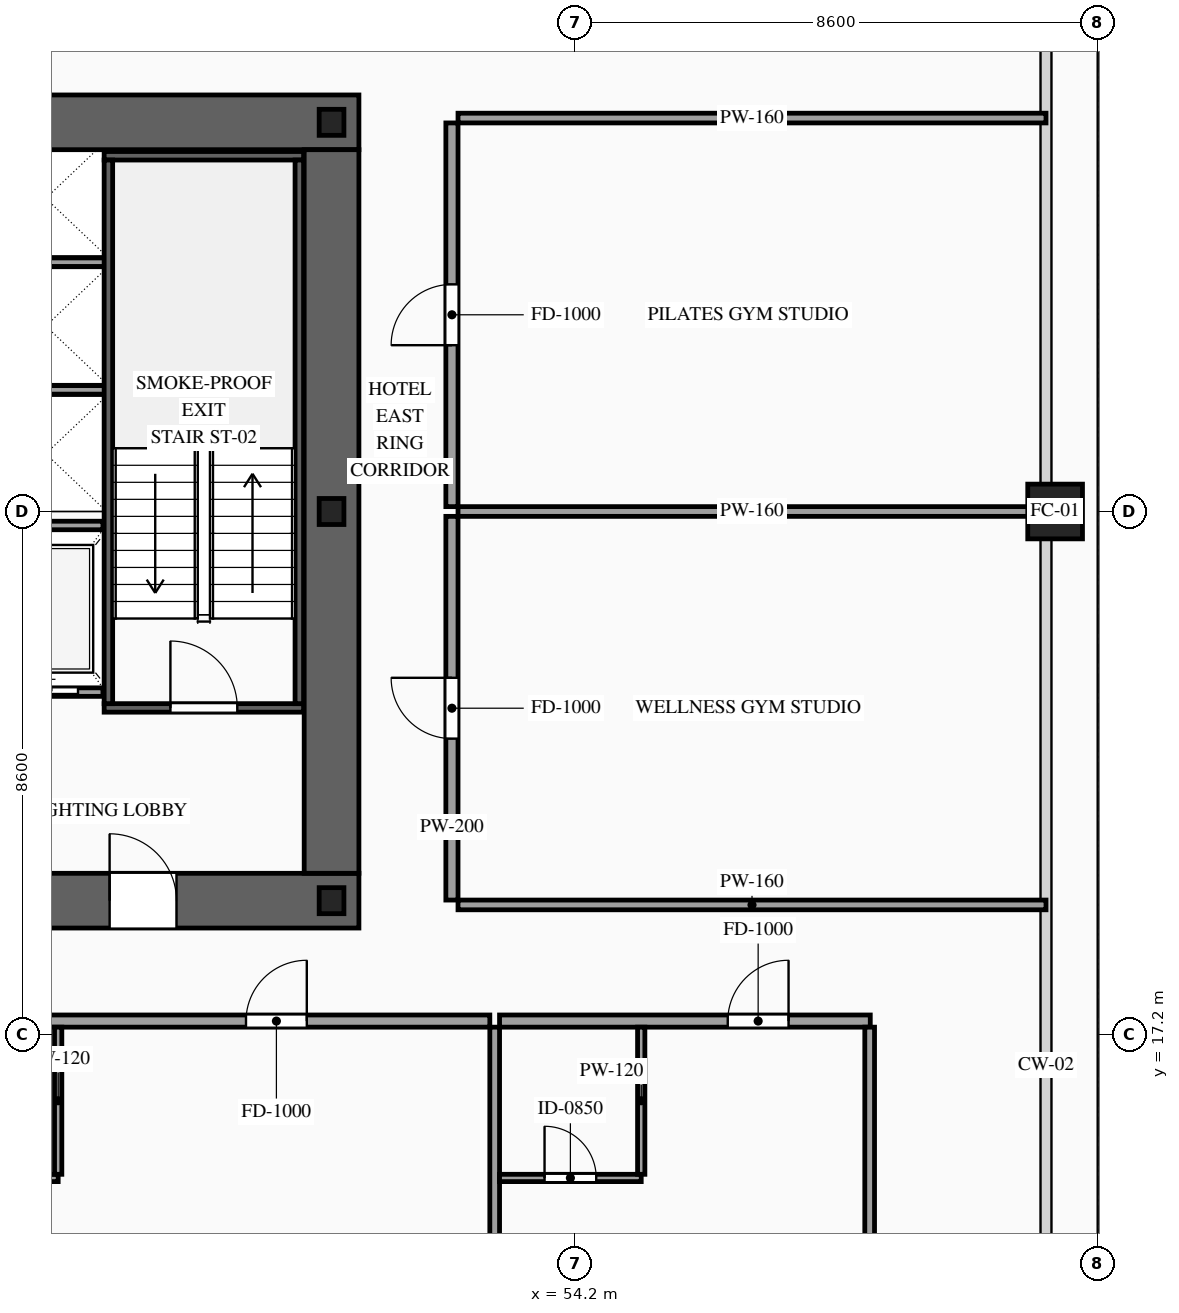
"""IFC4 building model, lengths in metres.
Left out: names, types, materials, properties, quantities, classifications, styles, units other than length and angle.
Written with IfcOpenShell. Run it as: python <this file> out.ifc"""

import sys

from ifc_helpers import new_model, si_unit, direction, frame, frame_2d, origin, origin_2d, place, context, subcontext, project, spatial, rectangle, hollow_rectangle, i_section, extrude, source, transform, mapped, element, fill, save


model = new_model("IFC4")
c1 = context("Model", 3, precision=1e-05, world=origin(), true_north=direction((0.0, 1.0)))
c2 = subcontext(c1, "Body", "Model", "MODEL_VIEW")
j1 = project(units=[si_unit("LENGTHUNIT", "METRE"), si_unit("PLANEANGLEUNIT", "RADIAN")], contexts=[c1])
p1 = place(None, origin())
s1 = spatial("IfcSite", under=j1, at=p1, CompositionType="ELEMENT")
p2 = place(p1, origin())
s2 = spatial("IfcBuilding", under=s1, at=p2, CompositionType="ELEMENT")
p3 = place(p2, frame((0.0, 0.0, 74.8)))
s3 = spatial("IfcBuildingStorey", under=s2, at=p3, CompositionType="ELEMENT", Elevation=74.8)
p4 = place(p3, frame((23.35, 19.4, 0.0), z_axis=(0.0, 0.0, 1.0), x_axis=(1.0, 0.0, 0.0)))
e1 = element("IfcWall", 1, at=p4, inside=s3, PredefinedType="SHEAR", context=c2, shape_type="SweptSolid", body=[
    extrude(rectangle(XDim=27.3, YDim=0.9, at=frame_2d((13.65, 0.0))), origin(), (0.0, 0.0, 1.0), 3.6),
])
p5 = place(p4, frame((2.1, 0.0, 0.0)))
e2 = element("IfcOpeningElement", 2, at=p5, cuts=e1, PredefinedType="OPENING", context=c2, shape_type="SweptSolid", body=[
    extrude(rectangle(XDim=1.1, YDim=2.2, at=frame_2d((0.55, 1.1))), frame((0.0, 0.465, 0.0), z_axis=(0.0, -1.0, 0.0), x_axis=(1.0, 0.0, 0.0)), (0.0, 0.0, 1.0), 0.93),
])
p6 = place(p4, frame((10.0, 0.0, 0.0)))
e3 = element("IfcOpeningElement", 3, at=p6, cuts=e1, PredefinedType="OPENING", context=c2, shape_type="SweptSolid", body=[
    extrude(rectangle(XDim=1.1, YDim=2.2, at=frame_2d((0.55, 1.1))), frame((0.0, 0.465, 0.0), z_axis=(0.0, -1.0, 0.0), x_axis=(1.0, 0.0, 0.0)), (0.0, 0.0, 1.0), 0.93),
])
p7 = place(p4, frame((23.2, 0.0, 0.0)))
e4 = element("IfcOpeningElement", 4, at=p7, cuts=e1, PredefinedType="OPENING", context=c2, shape_type="SweptSolid", body=[
    extrude(rectangle(XDim=1.1, YDim=2.2, at=frame_2d((0.55, 1.1))), frame((0.0, 0.465, 0.0), z_axis=(0.0, -1.0, 0.0), x_axis=(1.0, 0.0, 0.0)), (0.0, 0.0, 1.0), 0.93),
])
p8 = place(p4, frame((19.82, 0.0, 0.0)))
e5 = element("IfcOpeningElement", 5, at=p8, cuts=e1, PredefinedType="OPENING", context=c2, shape_type="SweptSolid", body=[
    extrude(rectangle(XDim=0.9, YDim=2.15, at=frame_2d((0.45, 1.075))), frame((0.0, 0.465, 0.0), z_axis=(0.0, -1.0, 0.0), x_axis=(1.0, 0.0, 0.0)), (0.0, 0.0, 1.0), 0.93),
])
p9 = place(p4, frame((18.38, 0.0, 0.0)))
e6 = element("IfcOpeningElement", 6, at=p9, cuts=e1, PredefinedType="OPENING", context=c2, shape_type="SweptSolid", body=[
    extrude(rectangle(XDim=0.9, YDim=2.15, at=frame_2d((0.45, 1.075))), frame((0.0, 0.465, 0.0), z_axis=(0.0, -1.0, 0.0), x_axis=(1.0, 0.0, 0.0)), (0.0, 0.0, 1.0), 0.93),
])
p10 = place(p3, frame((23.35, 32.2, 0.0), z_axis=(0.0, 0.0, 1.0), x_axis=(1.0, 0.0, 0.0)))
e7 = element("IfcWall", 7, at=p10, inside=s3, PredefinedType="SHEAR", context=c2, shape_type="SweptSolid", body=[
    extrude(rectangle(XDim=27.3, YDim=0.9, at=frame_2d((13.65, 0.0))), origin(), (0.0, 0.0, 1.0), 3.6),
])
p11 = place(p10, frame((4.72, 0.0, 0.0)))
e8 = element("IfcOpeningElement", 8, at=p11, cuts=e7, PredefinedType="OPENING", context=c2, shape_type="SweptSolid", body=[
    extrude(rectangle(XDim=0.9, YDim=2.15, at=frame_2d((0.45, 1.075))), frame((0.0, 0.465, 0.0), z_axis=(0.0, -1.0, 0.0), x_axis=(1.0, 0.0, 0.0)), (0.0, 0.0, 1.0), 0.93),
])
p12 = place(p10, frame((10.0, 0.0, 0.0)))
e9 = element("IfcOpeningElement", 9, at=p12, cuts=e7, PredefinedType="OPENING", context=c2, shape_type="SweptSolid", body=[
    extrude(rectangle(XDim=1.1, YDim=2.2, at=frame_2d((0.55, 1.1))), frame((0.0, 0.465, 0.0), z_axis=(0.0, -1.0, 0.0), x_axis=(1.0, 0.0, 0.0)), (0.0, 0.0, 1.0), 0.93),
])
p13 = place(p10, frame((15.85, 0.0, 0.0)))
e10 = element("IfcOpeningElement", 10, at=p13, cuts=e7, PredefinedType="OPENING", context=c2, shape_type="SweptSolid", body=[
    extrude(rectangle(XDim=1.1, YDim=2.2, at=frame_2d((0.55, 1.1))), frame((0.0, 0.465, 0.0), z_axis=(0.0, -1.0, 0.0), x_axis=(1.0, 0.0, 0.0)), (0.0, 0.0, 1.0), 0.93),
])
p14 = place(p10, frame((18.38, 0.0, 0.0)))
e11 = element("IfcOpeningElement", 11, at=p14, cuts=e7, PredefinedType="OPENING", context=c2, shape_type="SweptSolid", body=[
    extrude(rectangle(XDim=0.9, YDim=2.15, at=frame_2d((0.45, 1.075))), frame((0.0, 0.465, 0.0), z_axis=(0.0, -1.0, 0.0), x_axis=(1.0, 0.0, 0.0)), (0.0, 0.0, 1.0), 0.93),
])
p15 = place(p10, frame((19.82, 0.0, 0.0)))
e12 = element("IfcOpeningElement", 12, at=p15, cuts=e7, PredefinedType="OPENING", context=c2, shape_type="SweptSolid", body=[
    extrude(rectangle(XDim=0.9, YDim=2.15, at=frame_2d((0.45, 1.075))), frame((0.0, 0.465, 0.0), z_axis=(0.0, -1.0, 0.0), x_axis=(1.0, 0.0, 0.0)), (0.0, 0.0, 1.0), 0.93),
])
m1 = source(origin(), c2, "Body", "SweptSolid", [
    extrude(rectangle(XDim=11.9, YDim=0.9, at=frame_2d((5.95, 0.0))), origin(), (0.0, 0.0, 1.0), 3.6),
])
p16 = place(p3, frame((50.2, 19.85, 0.0), z_axis=(0.0, 0.0, 1.0), x_axis=(0.0, 1.0, 0.0)))
e13 = element("IfcWall", 13, at=p16, inside=s3, PredefinedType="SHEAR", context=c2, shape_type="MappedRepresentation", body=[
    mapped(m1, transform((0.0, 0.0, 0.0), scale=1.0)),
])
m2 = source(origin(), c2, "Body", "SweptSolid", [
    extrude(i_section(OverallWidth=0.407, OverallDepth=0.428, WebThickness=0.02, FlangeThickness=0.035, at=origin_2d()), origin(), (0.0, 0.0, 1.0), 3.6),
])
for number, where, z_axis, x_axis in (
    (14, (50.2, 19.4, 0.0), (0.0, 0.0, 1.0), (1.0, 0.0, 0.0)),
    (15, (50.2, 25.8, 0.0), (0.0, 0.0, 1.0), (1.0, 0.0, 0.0)),
    (16, (50.2, 32.2, 0.0), (0.0, 0.0, 1.0), (1.0, 0.0, 0.0)),
):
    element("IfcColumn", number, at=place(p3, frame(where, z_axis=z_axis, x_axis=x_axis)), inside=s3, PredefinedType="COLUMN", context=c2, shape_type="MappedRepresentation", body=[
        mapped(m2, transform((0.0, 0.0, 0.0), scale=1.0)),
    ])
m3 = source(origin(), c2, "Body", "SweptSolid", [
    extrude(hollow_rectangle(XDim=0.9, YDim=0.9, WallThickness=0.042, at=origin_2d()), origin(), (0.0, 0.0, 1.0), 3.6),
])
p17 = place(p3, frame((62.1, 25.8, 0.0), z_axis=(0.0, 0.0, 1.0), x_axis=(1.0, 0.0, 0.0)))
e17 = element("IfcColumn", 17, at=p17, inside=s3, PredefinedType="COLUMN", context=c2, shape_type="MappedRepresentation", body=[
    mapped(m3, transform((0.0, 0.0, 0.0), scale=1.0)),
])
p18 = place(p3, frame((44.52, 22.83, 0.0), z_axis=(0.0, 0.0, 1.0), x_axis=(1.0, 0.0, 0.0)))
e18 = element("IfcWall", 18, at=p18, inside=s3, PredefinedType="SOLIDWALL", context=c2, shape_type="SweptSolid", body=[
    extrude(rectangle(XDim=1.92, YDim=0.14, at=frame_2d((0.96, 0.0))), origin(), (0.0, 0.0, 1.0), 3.38),
])
p19 = place(p18, frame((0.41, 0.0, 0.0)))
e19 = element("IfcOpeningElement", 19, at=p19, cuts=e18, PredefinedType="OPENING", context=c2, shape_type="SweptSolid", body=[
    extrude(rectangle(XDim=1.1, YDim=2.2, at=frame_2d((0.55, 1.1))), frame((0.0, 0.085, 0.0), z_axis=(0.0, -1.0, 0.0), x_axis=(1.0, 0.0, 0.0)), (0.0, 0.0, 1.0), 0.17),
])
m4 = source(origin(), c2, "Body", "SweptSolid", [
    extrude(rectangle(XDim=1.92, YDim=0.14, at=frame_2d((0.96, 0.0))), origin(), (0.0, 0.0, 1.0), 3.38),
])
p20 = place(p3, frame((44.52, 25.57, 0.0), z_axis=(0.0, 0.0, 1.0), x_axis=(1.0, 0.0, 0.0)))
e20 = element("IfcWall", 20, at=p20, inside=s3, PredefinedType="SOLIDWALL", context=c2, shape_type="MappedRepresentation", body=[
    mapped(m4, transform((0.0, 0.0, 0.0), scale=1.0)),
])
m5 = source(origin(), c2, "Body", "SweptSolid", [
    extrude(rectangle(XDim=2.0, YDim=0.14, at=frame_2d((1.0, 0.0))), origin(), (0.0, 0.0, 1.0), 3.38),
])
for number, where, z_axis, x_axis in (
    (21, (44.5, 27.8, 0.0), (0.0, 0.0, 1.0), (1.0, 0.0, 0.0)),
    (22, (44.5, 29.9, 0.0), (0.0, 0.0, 1.0), (1.0, 0.0, 0.0)),
):
    element("IfcWall", number, at=place(p3, frame(where, z_axis=z_axis, x_axis=x_axis)), inside=s3, PredefinedType="SOLIDWALL", context=c2, shape_type="MappedRepresentation", body=[
        mapped(m5, transform((0.0, 0.0, 0.0), scale=1.0)),
    ])
p21 = place(p3, frame((46.46, 22.57, 0.0), z_axis=(0.0, 0.0, 1.0), x_axis=(1.0, 0.0, 0.0)))
e23 = element("IfcWall", 23, at=p21, inside=s3, PredefinedType="SOLIDWALL", context=c2, shape_type="SweptSolid", body=[
    extrude(rectangle(XDim=3.28, YDim=0.14, at=frame_2d((1.64, 0.0))), origin(), (0.0, 0.0, 1.0), 3.38),
])
p22 = place(p21, frame((1.09, 0.0, 0.0)))
e24 = element("IfcOpeningElement", 24, at=p22, cuts=e23, PredefinedType="OPENING", context=c2, shape_type="SweptSolid", body=[
    extrude(rectangle(XDim=1.1, YDim=2.2, at=frame_2d((0.55, 1.1))), frame((0.0, 0.085, 0.0), z_axis=(0.0, -1.0, 0.0), x_axis=(1.0, 0.0, 0.0)), (0.0, 0.0, 1.0), 0.17),
])
m6 = source(origin(), c2, "Body", "SweptSolid", [
    extrude(rectangle(XDim=3.28, YDim=0.14, at=frame_2d((1.64, 0.0))), origin(), (0.0, 0.0, 1.0), 3.38),
])
p23 = place(p3, frame((46.46, 31.65, 0.0), z_axis=(0.0, 0.0, 1.0), x_axis=(1.0, 0.0, 0.0)))
e25 = element("IfcWall", 25, at=p23, inside=s3, PredefinedType="SOLIDWALL", context=c2, shape_type="MappedRepresentation", body=[
    mapped(m6, transform((0.0, 0.0, 0.0), scale=1.0)),
])
m7 = source(origin(), c2, "Body", "SweptSolid", [
    extrude(rectangle(XDim=8.94, YDim=0.14, at=frame_2d((4.47, 0.0))), origin(), (0.0, 0.0, 1.0), 3.38),
])
for number, where, z_axis, x_axis in (
    (26, (46.53, 22.64, 0.0), (0.0, 0.0, 1.0), (0.0, 1.0, 0.0)),
    (27, (49.67, 22.64, 0.0), (0.0, 0.0, 1.0), (0.0, 1.0, 0.0)),
):
    element("IfcWall", number, at=place(p3, frame(where, z_axis=z_axis, x_axis=x_axis)), inside=s3, PredefinedType="SOLIDWALL", context=c2, shape_type="MappedRepresentation", body=[
        mapped(m7, transform((0.0, 0.0, 0.0), scale=1.0)),
    ])
p24 = place(p3, frame((43.374, 17.42, 0.0), z_axis=(0.0, 0.0, 1.0), x_axis=(1.0, 0.0, 0.0)))
e28 = element("IfcWall", 28, at=p24, inside=s3, PredefinedType="PARTITIONING", context=c2, shape_type="SweptSolid", body=[
    extrude(rectangle(XDim=9.429, YDim=0.2, at=frame_2d((4.714, 0.0))), origin(), (0.0, 0.0, 1.0), 3.38),
])
p25 = place(p24, frame((5.419, 0.0, 0.0)))
e29 = element("IfcOpeningElement", 29, at=p25, cuts=e28, PredefinedType="OPENING", context=c2, shape_type="SweptSolid", body=[
    extrude(rectangle(XDim=1.0, YDim=2.2, at=frame_2d((0.5, 1.1))), frame((0.0, 0.115, 0.0), z_axis=(0.0, -1.0, 0.0), x_axis=(1.0, 0.0, 0.0)), (0.0, 0.0, 1.0), 0.23),
])
m8 = source(origin(), c2, "Body", "SweptSolid", [
    extrude(rectangle(XDim=16.47, YDim=0.16, at=frame_2d((8.235, 0.0))), origin(), (0.0, 0.0, 1.0), 3.38),
])
p26 = place(p3, frame((52.883, 0.85, 0.0), z_axis=(0.0, 0.0, 1.0), x_axis=(0.0, 1.0, 0.0)))
e30 = element("IfcWall", 30, at=p26, inside=s3, PredefinedType="PARTITIONING", context=c2, shape_type="MappedRepresentation", body=[
    mapped(m8, transform((0.0, 0.0, 0.0), scale=1.0)),
])
p27 = place(p3, frame((43.374, 14.84, 0.0), z_axis=(0.0, 0.0, 1.0), x_axis=(1.0, 0.0, 0.0)))
e31 = element("IfcWall", 31, at=p27, inside=s3, PredefinedType="PARTITIONING", context=c2, shape_type="SweptSolid", body=[
    extrude(rectangle(XDim=2.33, YDim=0.12, at=frame_2d((1.165, 0.0))), origin(), (0.0, 0.0, 1.0), 3.38),
])
p28 = place(p27, frame((0.74, 0.0, 0.0)))
e32 = element("IfcOpeningElement", 32, at=p28, cuts=e31, PredefinedType="OPENING", context=c2, shape_type="SweptSolid", body=[
    extrude(rectangle(XDim=0.85, YDim=2.1, at=frame_2d((0.425, 1.05))), frame((0.0, 0.075, 0.0), z_axis=(0.0, -1.0, 0.0), x_axis=(1.0, 0.0, 0.0)), (0.0, 0.0, 1.0), 0.15),
])
m9 = source(origin(), c2, "Body", "SweptSolid", [
    extrude(rectangle(XDim=2.42, YDim=0.12, at=frame_2d((1.21, 0.0))), origin(), (0.0, 0.0, 1.0), 3.38),
])
p29 = place(p3, frame((45.704, 14.9, 0.0), z_axis=(0.0, 0.0, 1.0), x_axis=(0.0, 1.0, 0.0)))
e33 = element("IfcWall", 33, at=p29, inside=s3, PredefinedType="PARTITIONING", context=c2, shape_type="MappedRepresentation", body=[
    mapped(m9, transform((0.0, 0.0, 0.0), scale=1.0)),
])
p30 = place(p3, frame((52.963, 17.42, 0.0), z_axis=(0.0, 0.0, 1.0), x_axis=(1.0, 0.0, 0.0)))
e34 = element("IfcWall", 34, at=p30, inside=s3, PredefinedType="PARTITIONING", context=c2, shape_type="SweptSolid", body=[
    extrude(rectangle(XDim=6.097, YDim=0.2, at=frame_2d((3.049, 0.0))), origin(), (0.0, 0.0, 1.0), 3.38),
])
p31 = place(p30, frame((3.753, 0.0, 0.0)))
e35 = element("IfcOpeningElement", 35, at=p31, cuts=e34, PredefinedType="OPENING", context=c2, shape_type="SweptSolid", body=[
    extrude(rectangle(XDim=1.0, YDim=2.2, at=frame_2d((0.5, 1.1))), frame((0.0, 0.115, 0.0), z_axis=(0.0, -1.0, 0.0), x_axis=(1.0, 0.0, 0.0)), (0.0, 0.0, 1.0), 0.23),
])
m10 = source(origin(), c2, "Body", "SweptSolid", [
    extrude(rectangle(XDim=16.32, YDim=0.16, at=frame_2d((8.16, 0.0))), origin(), (0.0, 0.0, 1.0), 3.38),
])
p32 = place(p3, frame((59.05, 1.0, 0.0), z_axis=(0.0, 0.0, 1.0), x_axis=(0.0, 1.0, 0.0)))
e36 = element("IfcWall", 36, at=p32, inside=s3, PredefinedType="PARTITIONING", context=c2, shape_type="MappedRepresentation", body=[
    mapped(m10, transform((0.0, 0.0, 0.0), scale=1.0)),
])
p33 = place(p3, frame((52.963, 14.84, 0.0), z_axis=(0.0, 0.0, 1.0), x_axis=(1.0, 0.0, 0.0)))
e37 = element("IfcWall", 37, at=p33, inside=s3, PredefinedType="PARTITIONING", context=c2, shape_type="SweptSolid", body=[
    extrude(rectangle(XDim=2.33, YDim=0.12, at=frame_2d((1.165, 0.0))), origin(), (0.0, 0.0, 1.0), 3.38),
])
p34 = place(p33, frame((0.74, 0.0, 0.0)))
e38 = element("IfcOpeningElement", 38, at=p34, cuts=e37, PredefinedType="OPENING", context=c2, shape_type="SweptSolid", body=[
    extrude(rectangle(XDim=0.85, YDim=2.1, at=frame_2d((0.425, 1.05))), frame((0.0, 0.075, 0.0), z_axis=(0.0, -1.0, 0.0), x_axis=(1.0, 0.0, 0.0)), (0.0, 0.0, 1.0), 0.15),
])
p35 = place(p3, frame((55.293, 14.9, 0.0), z_axis=(0.0, 0.0, 1.0), x_axis=(0.0, 1.0, 0.0)))
e39 = element("IfcWall", 39, at=p35, inside=s3, PredefinedType="PARTITIONING", context=c2, shape_type="MappedRepresentation", body=[
    mapped(m9, transform((0.0, 0.0, 0.0), scale=1.0)),
])
p36 = place(p3, frame((52.18, 19.41, 0.0), z_axis=(0.0, 0.0, 1.0), x_axis=(0.0, 1.0, 0.0)))
e40 = element("IfcWall", 40, at=p36, inside=s3, PredefinedType="PARTITIONING", context=c2, shape_type="SweptSolid", body=[
    extrude(rectangle(XDim=6.31, YDim=0.2, at=frame_2d((3.155, 0.0))), origin(), (0.0, 0.0, 1.0), 3.38),
])
p37 = place(p36, frame((2.655, 0.0, 0.0)))
e41 = element("IfcOpeningElement", 41, at=p37, cuts=e40, PredefinedType="OPENING", context=c2, shape_type="SweptSolid", body=[
    extrude(rectangle(XDim=1.0, YDim=2.2, at=frame_2d((0.5, 1.1))), frame((0.0, 0.115, 0.0), z_axis=(0.0, -1.0, 0.0), x_axis=(1.0, 0.0, 0.0)), (0.0, 0.0, 1.0), 0.23),
])
m11 = source(origin(), c2, "Body", "SweptSolid", [
    extrude(rectangle(XDim=9.67, YDim=0.16, at=frame_2d((4.835, 0.0))), origin(), (0.0, 0.0, 1.0), 2.575),
])
p38 = place(p3, frame((52.28, 25.8, 0.0), z_axis=(0.0, 0.0, 1.0), x_axis=(1.0, 0.0, 0.0)))
e42 = element("IfcWall", 42, at=p38, inside=s3, PredefinedType="PARTITIONING", context=c2, shape_type="MappedRepresentation", body=[
    mapped(m11, transform((0.0, 0.0, 0.0), scale=1.0)),
])
m12 = source(origin(), c2, "Body", "SweptSolid", [
    extrude(rectangle(XDim=9.67, YDim=0.16, at=frame_2d((4.835, 0.0))), origin(), (0.0, 0.0, 1.0), 2.875),
])
p39 = place(p3, frame((52.28, 19.33, 0.0), z_axis=(0.0, 0.0, 1.0), x_axis=(1.0, 0.0, 0.0)))
e43 = element("IfcWall", 43, at=p39, inside=s3, PredefinedType="PARTITIONING", context=c2, shape_type="MappedRepresentation", body=[
    mapped(m12, transform((0.0, 0.0, 0.0), scale=1.0)),
])
p40 = place(p3, frame((52.18, 25.88, 0.0), z_axis=(0.0, 0.0, 1.0), x_axis=(0.0, 1.0, 0.0)))
e44 = element("IfcWall", 44, at=p40, inside=s3, PredefinedType="PARTITIONING", context=c2, shape_type="SweptSolid", body=[
    extrude(rectangle(XDim=6.31, YDim=0.2, at=frame_2d((3.155, 0.0))), origin(), (0.0, 0.0, 1.0), 3.38),
])
p41 = place(p40, frame((2.655, 0.0, 0.0)))
e45 = element("IfcOpeningElement", 45, at=p41, cuts=e44, PredefinedType="OPENING", context=c2, shape_type="SweptSolid", body=[
    extrude(rectangle(XDim=1.0, YDim=2.2, at=frame_2d((0.5, 1.1))), frame((0.0, 0.115, 0.0), z_axis=(0.0, -1.0, 0.0), x_axis=(1.0, 0.0, 0.0)), (0.0, 0.0, 1.0), 0.23),
])
p42 = place(p3, frame((52.28, 32.27, 0.0), z_axis=(0.0, 0.0, 1.0), x_axis=(1.0, 0.0, 0.0)))
e46 = element("IfcWall", 46, at=p42, inside=s3, PredefinedType="PARTITIONING", context=c2, shape_type="MappedRepresentation", body=[
    mapped(m12, transform((0.0, 0.0, 0.0), scale=1.0)),
])
m13 = source(origin(), c2, "Body", "SweptSolid", [
    extrude(rectangle(XDim=1.1, YDim=2.2, at=frame_2d((0.55, 1.1))), frame((0.0, 0.025, 0.0), z_axis=(0.0, -1.0, 0.0), x_axis=(1.0, 0.0, 0.0)), (0.0, 0.0, 1.0), 0.05),
])
p43 = place(p19, origin())
e47 = element("IfcDoor", 47, at=p43, inside=s3, OperationType="SLIDING_TO_RIGHT", PredefinedType="DOOR", context=c2, shape_type="MappedRepresentation", body=[
    mapped(m13, transform((0.0, 0.0, 0.0), scale=1.0)),
])
fill(e19, e47)
m14 = source(origin(), c2, "Body", "SweptSolid", [
    extrude(rectangle(XDim=1.1, YDim=2.2, at=frame_2d((0.55, 1.1))), frame((0.0, 0.025, 0.0), z_axis=(0.0, -1.0, 0.0), x_axis=(1.0, 0.0, 0.0)), (0.0, 0.0, 1.0), 0.05),
])
p44 = place(p22, origin())
e48 = element("IfcDoor", 48, at=p44, inside=s3, OperationType="SINGLE_SWING_LEFT", PredefinedType="DOOR", context=c2, shape_type="MappedRepresentation", body=[
    mapped(m14, transform((0.0, 0.0, 0.0), scale=1.0)),
])
fill(e24, e48)
p45 = place(p7, origin())
e49 = element("IfcDoor", 49, at=p45, inside=s3, OperationType="SINGLE_SWING_LEFT", PredefinedType="DOOR", context=c2, shape_type="MappedRepresentation", body=[
    mapped(m14, transform((0.0, 0.0, 0.0), scale=1.0)),
])
fill(e4, e49)
m15 = source(origin(), c2, "Body", "SweptSolid", [
    extrude(rectangle(XDim=1.0, YDim=2.2, at=frame_2d((0.5, 1.1))), frame((0.0, 0.025, 0.0), z_axis=(0.0, -1.0, 0.0), x_axis=(1.0, 0.0, 0.0)), (0.0, 0.0, 1.0), 0.05),
])
p46 = place(p25, origin())
e50 = element("IfcDoor", 50, at=p46, inside=s3, OperationType="SINGLE_SWING_RIGHT", PredefinedType="DOOR", context=c2, shape_type="MappedRepresentation", body=[
    mapped(m15, transform((0.0, 0.0, 0.0), scale=1.0)),
])
fill(e29, e50)
p47 = place(p31, origin())
e51 = element("IfcDoor", 51, at=p47, inside=s3, OperationType="SINGLE_SWING_RIGHT", PredefinedType="DOOR", context=c2, shape_type="MappedRepresentation", body=[
    mapped(m15, transform((0.0, 0.0, 0.0), scale=1.0)),
])
fill(e35, e51)
m16 = source(origin(), c2, "Body", "SweptSolid", [
    extrude(rectangle(XDim=0.85, YDim=2.1, at=frame_2d((0.425, 1.05))), frame((0.0, 0.025, 0.0), z_axis=(0.0, -1.0, 0.0), x_axis=(1.0, 0.0, 0.0)), (0.0, 0.0, 1.0), 0.05),
])
p48 = place(p34, origin())
e52 = element("IfcDoor", 52, at=p48, inside=s3, OperationType="SINGLE_SWING_LEFT", PredefinedType="DOOR", context=c2, shape_type="MappedRepresentation", body=[
    mapped(m16, transform((0.0, 0.0, 0.0), scale=1.0)),
])
fill(e38, e52)
p49 = place(p37, origin())
e53 = element("IfcDoor", 53, at=p49, inside=s3, OperationType="SINGLE_SWING_RIGHT", PredefinedType="DOOR", context=c2, shape_type="MappedRepresentation", body=[
    mapped(m15, transform((0.0, 0.0, 0.0), scale=1.0)),
])
fill(e41, e53)
p50 = place(p41, origin())
e54 = element("IfcDoor", 54, at=p50, inside=s3, OperationType="SINGLE_SWING_LEFT", PredefinedType="DOOR", context=c2, shape_type="MappedRepresentation", body=[
    mapped(m15, transform((0.0, 0.0, 0.0), scale=1.0)),
])
fill(e45, e54)
save(model, sys.argv[1])
